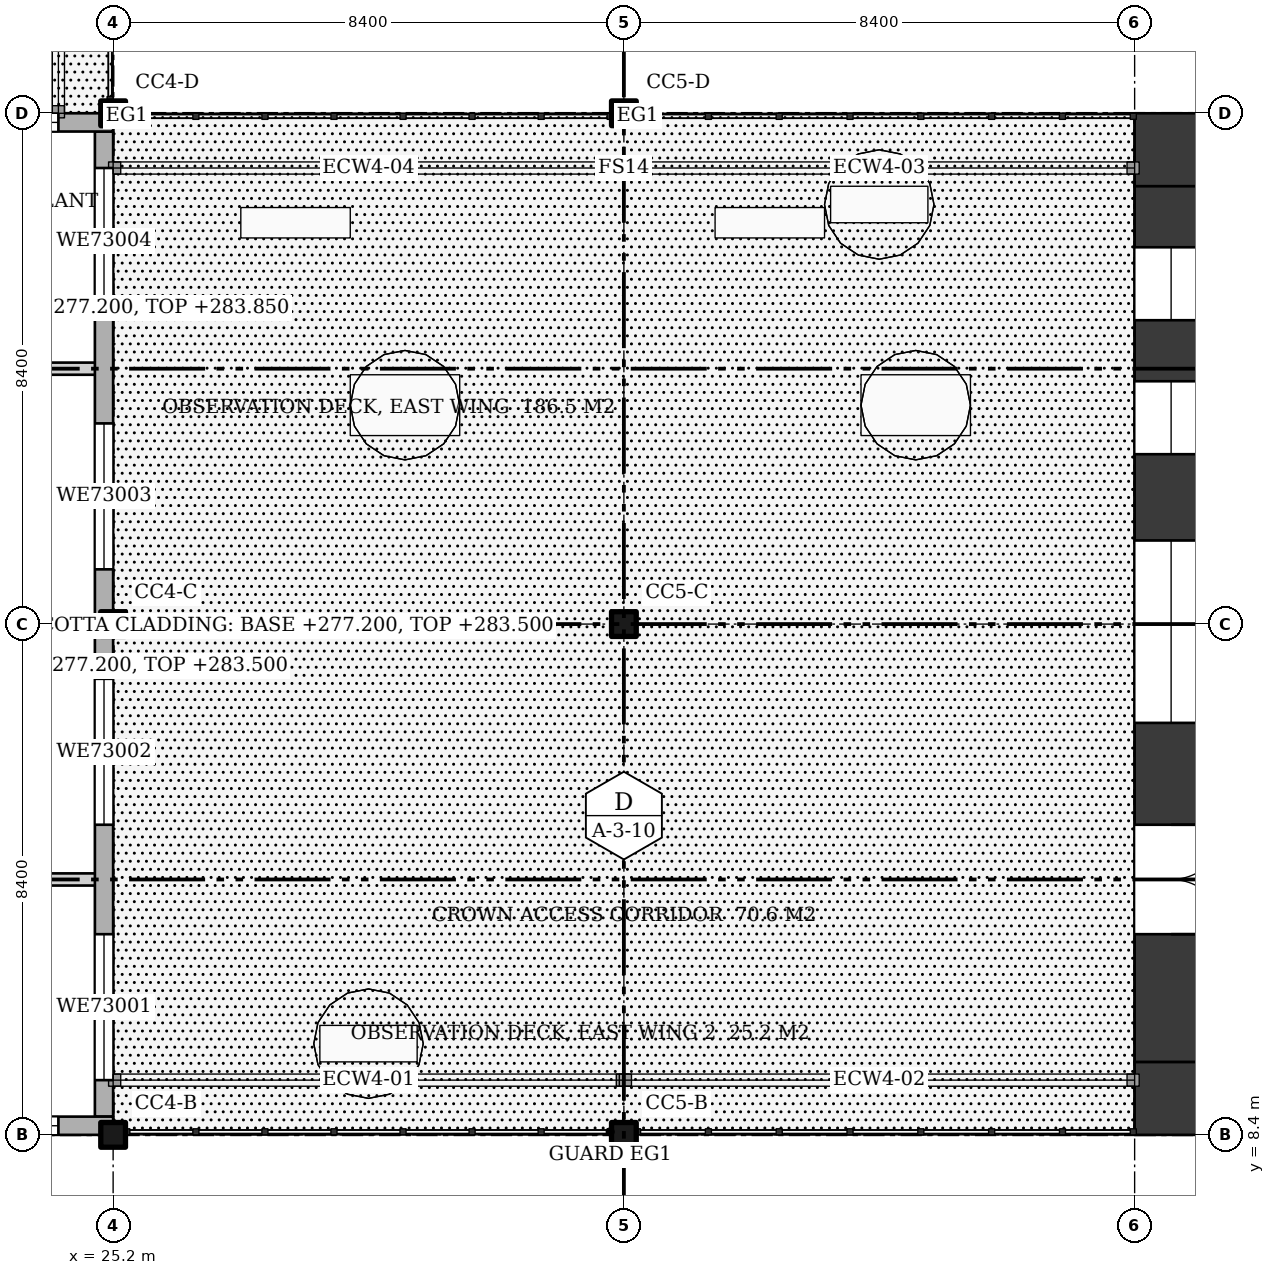
"""IFC4 building model, lengths in metres.
Left out: names, types, materials, properties, quantities, classifications, styles, units other than length and angle.
Written with IfcOpenShell. Run it as: python <this file> out.ifc"""

import sys

from ifc_helpers import new_model, si_unit, direction, frame, frame_2d, origin, origin_2d, place, context, subcontext, project, spatial, rectangle, hollow_circle, extrude, element, fill, save


model = new_model("IFC4")
c1 = context("Model", 3, precision=1e-05, world=origin(), true_north=direction((0.0, 1.0)))
c2 = subcontext(c1, "Body", "Model", "MODEL_VIEW")
j1 = project(units=[si_unit("LENGTHUNIT", "METRE"), si_unit("PLANEANGLEUNIT", "RADIAN")], contexts=[c1])
p1 = place(None, origin())
s1 = spatial("IfcSite", under=j1, at=p1, CompositionType="ELEMENT")
p2 = place(p1, origin())
s2 = spatial("IfcBuilding", under=s1, at=p2, CompositionType="ELEMENT")
p3 = place(p2, frame((0.0, 0.0, 277.2)))
s3 = spatial("IfcBuildingStorey", under=s2, at=p3, CompositionType="ELEMENT", Elevation=277.2)
for number, where, z_axis, x_axis in (
    (1, (25.2, 8.4, 0.0), (0.0, 0.0, 1.0), (1.0, 0.0, 0.0)),
    (2, (25.2, 16.8, 0.0), (0.0, 0.0, 1.0), (1.0, 0.0, 0.0)),
    (3, (25.2, 25.2, 0.0), (0.0, 0.0, 1.0), (1.0, 0.0, 0.0)),
    (4, (33.6, 8.4, 0.0), (0.0, 0.0, 1.0), (1.0, 0.0, 0.0)),
    (5, (33.6, 16.8, 0.0), (0.0, 0.0, 1.0), (1.0, 0.0, 0.0)),
    (6, (33.6, 25.2, 0.0), (0.0, 0.0, 1.0), (1.0, 0.0, 0.0)),
):
    element("IfcColumn", number, at=place(p3, frame(where, z_axis=z_axis, x_axis=x_axis)), inside=s3, PredefinedType="COLUMN", context=c2, shape_type="SweptSolid", body=[
        extrude(hollow_circle(Radius=0.203, WallThickness=0.016, at=origin_2d()), origin(), (0.0, 0.0, 1.0), 6.65),
    ])
p4 = place(p3, frame((42.0, 9.0, 0.0), z_axis=(0.0, 0.0, 1.0), x_axis=(1.0, 0.0, 0.0)))
e7 = element("IfcWall", 7, at=p4, inside=s3, PredefinedType="SHEAR", context=c2, shape_type="SweptSolid", body=[
    extrude(rectangle(XDim=16.8, YDim=1.2, at=frame_2d((8.4, 0.0))), origin(), (0.0, 0.0, 1.0), 6.58),
])
p5 = place(p4, frame((1.6, 0.0, 0.6)))
e8 = element("IfcOpeningElement", 8, at=p5, cuts=e7, PredefinedType="OPENING", context=c2, shape_type="SweptSolid", body=[
    extrude(rectangle(XDim=2.4, YDim=2.1, at=frame_2d((1.2, 1.05))), frame((0.0, 0.61, 0.0), z_axis=(0.0, -1.0, 0.0), x_axis=(1.0, 0.0, 0.0)), (0.0, 0.0, 1.0), 1.22),
])
p6 = place(p4, frame((4.938, 0.0, 1.6)))
e9 = element("IfcOpeningElement", 9, at=p6, cuts=e7, PredefinedType="OPENING", context=c2, shape_type="SweptSolid", body=[
    extrude(rectangle(XDim=3.0, YDim=1.2, at=frame_2d((1.5, 0.6))), frame((0.0, 0.61, 0.0), z_axis=(0.0, -1.0, 0.0), x_axis=(1.0, 0.0, 0.0)), (0.0, 0.0, 1.0), 1.22),
])
p7 = place(p4, frame((8.863, 0.0, 1.6)))
e10 = element("IfcOpeningElement", 10, at=p7, cuts=e7, PredefinedType="OPENING", context=c2, shape_type="SweptSolid", body=[
    extrude(rectangle(XDim=3.0, YDim=1.2, at=frame_2d((1.5, 0.6))), frame((0.0, 0.61, 0.0), z_axis=(0.0, -1.0, 0.0), x_axis=(1.0, 0.0, 0.0)), (0.0, 0.0, 1.0), 1.22),
])
p8 = place(p4, frame((12.8, 0.0, 0.6)))
e11 = element("IfcOpeningElement", 11, at=p8, cuts=e7, PredefinedType="OPENING", context=c2, shape_type="SweptSolid", body=[
    extrude(rectangle(XDim=2.4, YDim=2.1, at=frame_2d((1.2, 1.05))), frame((0.0, 0.61, 0.0), z_axis=(0.0, -1.0, 0.0), x_axis=(1.0, 0.0, 0.0)), (0.0, 0.0, 1.0), 1.22),
])
p9 = place(p3, frame((42.0, 24.6, 0.0), z_axis=(0.0, 0.0, 1.0), x_axis=(1.0, 0.0, 0.0)))
e12 = element("IfcWall", 12, at=p9, inside=s3, PredefinedType="SHEAR", context=c2, shape_type="SweptSolid", body=[
    extrude(rectangle(XDim=16.8, YDim=1.2, at=frame_2d((8.4, 0.0))), origin(), (0.0, 0.0, 1.0), 6.58),
])
p10 = place(p9, frame((1.8, 0.0, 0.5)))
e13 = element("IfcOpeningElement", 13, at=p10, cuts=e12, PredefinedType="OPENING", context=c2, shape_type="SweptSolid", body=[
    extrude(rectangle(XDim=1.8, YDim=2.4, at=frame_2d((0.9, 1.2))), frame((0.0, 0.61, 0.0), z_axis=(0.0, -1.0, 0.0), x_axis=(1.0, 0.0, 0.0)), (0.0, 0.0, 1.0), 1.22),
])
p11 = place(p9, frame((4.644, 0.0, 1.6)))
e14 = element("IfcOpeningElement", 14, at=p11, cuts=e12, PredefinedType="OPENING", context=c2, shape_type="SweptSolid", body=[
    extrude(rectangle(XDim=1.2, YDim=1.2, at=frame_2d((0.6, 0.6))), frame((0.0, 0.61, 0.0), z_axis=(0.0, -1.0, 0.0), x_axis=(1.0, 0.0, 0.0)), (0.0, 0.0, 1.0), 1.22),
])
p12 = place(p9, frame((6.45, 0.0, 1.6)))
e15 = element("IfcOpeningElement", 15, at=p12, cuts=e12, PredefinedType="OPENING", context=c2, shape_type="SweptSolid", body=[
    extrude(rectangle(XDim=1.8, YDim=1.2, at=frame_2d((0.9, 0.6))), frame((0.0, 0.61, 0.0), z_axis=(0.0, -1.0, 0.0), x_axis=(1.0, 0.0, 0.0)), (0.0, 0.0, 1.0), 1.22),
])
p13 = place(p9, frame((12.65, 0.0, 0.6)))
e16 = element("IfcOpeningElement", 16, at=p13, cuts=e12, PredefinedType="OPENING", context=c2, shape_type="SweptSolid", body=[
    extrude(rectangle(XDim=1.0, YDim=2.1, at=frame_2d((0.5, 1.05))), frame((0.0, 0.61, 0.0), z_axis=(0.0, -1.0, 0.0), x_axis=(1.0, 0.0, 0.0)), (0.0, 0.0, 1.0), 1.22),
])
p14 = place(p9, frame((14.175, 0.0, 1.6)))
e17 = element("IfcOpeningElement", 17, at=p14, cuts=e12, PredefinedType="OPENING", context=c2, shape_type="SweptSolid", body=[
    extrude(rectangle(XDim=1.2, YDim=1.2, at=frame_2d((0.6, 0.6))), frame((0.0, 0.61, 0.0), z_axis=(0.0, -1.0, 0.0), x_axis=(1.0, 0.0, 0.0)), (0.0, 0.0, 1.0), 1.22),
])
p15 = place(p3, frame((42.6, 9.6, 0.0), z_axis=(0.0, 0.0, 1.0), x_axis=(0.0, 1.0, 0.0)))
e18 = element("IfcWall", 18, at=p15, inside=s3, PredefinedType="SHEAR", context=c2, shape_type="SweptSolid", body=[
    extrude(rectangle(XDim=14.4, YDim=1.2, at=frame_2d((7.2, 0.0))), origin(), (0.0, 0.0, 1.0), 6.58),
])
p16 = place(p15, frame((2.1, 0.0, 0.0)))
e19 = element("IfcOpeningElement", 19, at=p16, cuts=e18, PredefinedType="OPENING", context=c2, shape_type="SweptSolid", body=[
    extrude(rectangle(XDim=1.8, YDim=2.1, at=frame_2d((0.9, 1.05))), frame((0.0, 0.61, 0.0), z_axis=(0.0, -1.0, 0.0), x_axis=(1.0, 0.0, 0.0)), (0.0, 0.0, 1.0), 1.22),
])
p17 = place(p15, frame((5.575, 0.0, 0.6)))
e20 = element("IfcOpeningElement", 20, at=p17, cuts=e18, PredefinedType="OPENING", context=c2, shape_type="SweptSolid", body=[
    extrude(rectangle(XDim=3.0, YDim=2.1, at=frame_2d((1.5, 1.05))), frame((0.0, 0.61, 0.0), z_axis=(0.0, -1.0, 0.0), x_axis=(1.0, 0.0, 0.0)), (0.0, 0.0, 1.0), 1.22),
])
p18 = place(p15, frame((9.993, 0.0, 0.5)))
e21 = element("IfcOpeningElement", 21, at=p18, cuts=e18, PredefinedType="OPENING", context=c2, shape_type="SweptSolid", body=[
    extrude(rectangle(XDim=1.2, YDim=2.4, at=frame_2d((0.6, 1.2))), frame((0.0, 0.61, 0.0), z_axis=(0.0, -1.0, 0.0), x_axis=(1.0, 0.0, 0.0)), (0.0, 0.0, 1.0), 1.22),
])
p19 = place(p15, frame((12.197, 0.0, 0.5)))
e22 = element("IfcOpeningElement", 22, at=p19, cuts=e18, PredefinedType="OPENING", context=c2, shape_type="SweptSolid", body=[
    extrude(rectangle(XDim=1.2, YDim=2.4, at=frame_2d((0.6, 1.2))), frame((0.0, 0.61, 0.0), z_axis=(0.0, -1.0, 0.0), x_axis=(1.0, 0.0, 0.0)), (0.0, 0.0, 1.0), 1.22),
])
p20 = place(p3, frame((19.1, 12.6, 0.0), z_axis=(0.0, 0.0, 1.0), x_axis=(1.0, 0.0, 0.0)))
e23 = element("IfcWall", 23, at=p20, inside=s3, PredefinedType="PARTITIONING", context=c2, shape_type="SweptSolid", body=[
    extrude(rectangle(XDim=5.95, YDim=0.2, at=frame_2d((2.975, 0.0))), origin(), (0.0, 0.0, 1.0), 6.65),
])
p21 = place(p20, frame((2.475, 0.0, 0.0)))
e24 = element("IfcOpeningElement", 24, at=p21, cuts=e23, PredefinedType="OPENING", context=c2, shape_type="SweptSolid", body=[
    extrude(rectangle(XDim=1.0, YDim=2.1, at=frame_2d((0.5, 1.05))), frame((0.0, 0.11, 0.0), z_axis=(0.0, -1.0, 0.0), x_axis=(1.0, 0.0, 0.0)), (0.0, 0.0, 1.0), 0.22),
])
p22 = place(p3, frame((19.1, 16.8, 0.0), z_axis=(0.0, 0.0, 1.0), x_axis=(1.0, 0.0, 0.0)))
e25 = element("IfcWall", 25, at=p22, inside=s3, PredefinedType="PARTITIONING", context=c2, shape_type="SweptSolid", body=[
    extrude(rectangle(XDim=5.9, YDim=0.2, at=frame_2d((2.95, 0.0))), origin(), (0.0, 0.0, 1.0), 6.3),
])
p23 = place(p3, frame((19.1, 21.0, 0.0), z_axis=(0.0, 0.0, 1.0), x_axis=(1.0, 0.0, 0.0)))
e26 = element("IfcWall", 26, at=p23, inside=s3, PredefinedType="PARTITIONING", context=c2, shape_type="SweptSolid", body=[
    extrude(rectangle(XDim=5.95, YDim=0.2, at=frame_2d((2.975, 0.0))), origin(), (0.0, 0.0, 1.0), 6.65),
])
p24 = place(p3, frame((25.05, 8.7, 0.0), z_axis=(0.0, 0.0, 1.0), x_axis=(0.0, 1.0, 0.0)))
e27 = element("IfcWall", 27, at=p24, inside=s3, PredefinedType="SOLIDWALL", context=c2, shape_type="SweptSolid", body=[
    extrude(rectangle(XDim=16.2, YDim=0.3, at=frame_2d((8.1, 0.0))), origin(), (0.0, 0.0, 1.0), 6.3),
])
p25 = place(p24, frame((0.6, 0.0, 0.6)))
e28 = element("IfcOpeningElement", 28, at=p25, cuts=e27, PredefinedType="OPENING", context=c2, shape_type="SweptSolid", body=[
    extrude(rectangle(XDim=2.4, YDim=2.4, at=frame_2d((1.2, 1.2))), frame((0.0, 0.16, 0.0), z_axis=(0.0, -1.0, 0.0), x_axis=(1.0, 0.0, 0.0)), (0.0, 0.0, 1.0), 0.32),
])
p26 = place(p24, frame((4.8, 0.0, 0.6)))
e29 = element("IfcOpeningElement", 29, at=p26, cuts=e27, PredefinedType="OPENING", context=c2, shape_type="SweptSolid", body=[
    extrude(rectangle(XDim=2.4, YDim=2.4, at=frame_2d((1.2, 1.2))), frame((0.0, 0.16, 0.0), z_axis=(0.0, -1.0, 0.0), x_axis=(1.0, 0.0, 0.0)), (0.0, 0.0, 1.0), 0.32),
])
p27 = place(p24, frame((9.0, 0.0, 0.6)))
e30 = element("IfcOpeningElement", 30, at=p27, cuts=e27, PredefinedType="OPENING", context=c2, shape_type="SweptSolid", body=[
    extrude(rectangle(XDim=2.4, YDim=2.4, at=frame_2d((1.2, 1.2))), frame((0.0, 0.16, 0.0), z_axis=(0.0, -1.0, 0.0), x_axis=(1.0, 0.0, 0.0)), (0.0, 0.0, 1.0), 0.32),
])
p28 = place(p24, frame((13.2, 0.0, 0.6)))
e31 = element("IfcOpeningElement", 31, at=p28, cuts=e27, PredefinedType="OPENING", context=c2, shape_type="SweptSolid", body=[
    extrude(rectangle(XDim=2.4, YDim=2.4, at=frame_2d((1.2, 1.2))), frame((0.0, 0.16, 0.0), z_axis=(0.0, -1.0, 0.0), x_axis=(1.0, 0.0, 0.0)), (0.0, 0.0, 1.0), 0.32),
])
p29 = place(p3, frame((25.2, 25.05, 0.0), z_axis=(0.0, 0.0, 1.0), x_axis=(-1.0, 0.0, 0.0)))
e32 = element("IfcWall", 32, at=p29, inside=s3, PredefinedType="SOLIDWALL", context=c2, shape_type="SweptSolid", body=[
    extrude(rectangle(XDim=16.8, YDim=0.3, at=frame_2d((8.4, 0.0))), origin(), (0.0, 0.0, 1.0), 6.3),
])
p30 = place(p29, frame((13.5, 0.0, 0.6)))
e33 = element("IfcOpeningElement", 33, at=p30, cuts=e32, PredefinedType="OPENING", context=c2, shape_type="SweptSolid", body=[
    extrude(rectangle(XDim=2.4, YDim=2.4, at=frame_2d((1.2, 1.2))), frame((0.0, 0.16, 0.0), z_axis=(0.0, -1.0, 0.0), x_axis=(1.0, 0.0, 0.0)), (0.0, 0.0, 1.0), 0.32),
])
p31 = place(p29, frame((9.0, 0.0, 0.6)))
e34 = element("IfcOpeningElement", 34, at=p31, cuts=e32, PredefinedType="OPENING", context=c2, shape_type="SweptSolid", body=[
    extrude(rectangle(XDim=2.4, YDim=2.4, at=frame_2d((1.2, 1.2))), frame((0.0, 0.16, 0.0), z_axis=(0.0, -1.0, 0.0), x_axis=(1.0, 0.0, 0.0)), (0.0, 0.0, 1.0), 0.32),
])
p32 = place(p29, frame((0.9, 0.0, 0.6)))
e35 = element("IfcOpeningElement", 35, at=p32, cuts=e32, PredefinedType="OPENING", context=c2, shape_type="SweptSolid", body=[
    extrude(rectangle(XDim=2.4, YDim=2.4, at=frame_2d((1.2, 1.2))), frame((0.0, 0.16, 0.0), z_axis=(0.0, -1.0, 0.0), x_axis=(1.0, 0.0, 0.0)), (0.0, 0.0, 1.0), 0.32),
])
p33 = place(p3, frame((8.4, 8.55, 0.0), z_axis=(0.0, 0.0, 1.0), x_axis=(1.0, 0.0, 0.0)))
e36 = element("IfcWall", 36, at=p33, inside=s3, PredefinedType="SOLIDWALL", context=c2, shape_type="SweptSolid", body=[
    extrude(rectangle(XDim=16.8, YDim=0.3, at=frame_2d((8.4, 0.0))), origin(), (0.0, 0.0, 1.0), 6.062),
])
p34 = place(p33, frame((0.9, 0.0, 0.6)))
e37 = element("IfcOpeningElement", 37, at=p34, cuts=e36, PredefinedType="OPENING", context=c2, shape_type="SweptSolid", body=[
    extrude(rectangle(XDim=2.4, YDim=2.4, at=frame_2d((1.2, 1.2))), frame((0.0, 0.16, 0.0), z_axis=(0.0, -1.0, 0.0), x_axis=(1.0, 0.0, 0.0)), (0.0, 0.0, 1.0), 0.32),
])
p35 = place(p33, frame((5.1, 0.0, 0.6)))
e38 = element("IfcOpeningElement", 38, at=p35, cuts=e36, PredefinedType="OPENING", context=c2, shape_type="SweptSolid", body=[
    extrude(rectangle(XDim=2.4, YDim=2.4, at=frame_2d((1.2, 1.2))), frame((0.0, 0.16, 0.0), z_axis=(0.0, -1.0, 0.0), x_axis=(1.0, 0.0, 0.0)), (0.0, 0.0, 1.0), 0.32),
])
p36 = place(p33, frame((9.3, 0.0, 0.6)))
e39 = element("IfcOpeningElement", 39, at=p36, cuts=e36, PredefinedType="OPENING", context=c2, shape_type="SweptSolid", body=[
    extrude(rectangle(XDim=2.4, YDim=2.4, at=frame_2d((1.2, 1.2))), frame((0.0, 0.16, 0.0), z_axis=(0.0, -1.0, 0.0), x_axis=(1.0, 0.0, 0.0)), (0.0, 0.0, 1.0), 0.32),
])
p37 = place(p33, frame((13.5, 0.0, 0.6)))
e40 = element("IfcOpeningElement", 40, at=p37, cuts=e36, PredefinedType="OPENING", context=c2, shape_type="SweptSolid", body=[
    extrude(rectangle(XDim=2.4, YDim=2.4, at=frame_2d((1.2, 1.2))), frame((0.0, 0.16, 0.0), z_axis=(0.0, -1.0, 0.0), x_axis=(1.0, 0.0, 0.0)), (0.0, 0.0, 1.0), 0.32),
])
p38 = place(p16, frame((1.8, 0.0, 0.0), z_axis=(0.0, 0.0, 1.0), x_axis=(-1.0, 0.0, 0.0)))
e41 = element("IfcDoor", 41, at=p38, inside=s3, OperationType="DOUBLE_DOOR_SINGLE_SWING", PredefinedType="DOOR", context=c2, shape_type="SweptSolid", body=[
    extrude(rectangle(XDim=1.8, YDim=2.1, at=frame_2d((0.9, 1.05))), frame((0.0, 0.025, 0.0), z_axis=(0.0, -1.0, 0.0), x_axis=(1.0, 0.0, 0.0)), (0.0, 0.0, 1.0), 0.05),
])
fill(e19, e41)
p39 = place(p17, origin())
e42 = element("IfcWindow", 42, at=p39, inside=s3, PartitioningType="SINGLE_PANEL", PredefinedType="WINDOW", context=c2, shape_type="SweptSolid", body=[
    extrude(rectangle(XDim=3.0, YDim=2.1, at=frame_2d((1.5, 1.05))), frame((0.0, 0.03, 0.0), z_axis=(0.0, -1.0, 0.0), x_axis=(1.0, 0.0, 0.0)), (0.0, 0.0, 1.0), 0.06),
])
fill(e20, e42)
p40 = place(p18, origin())
e43 = element("IfcWindow", 43, at=p40, inside=s3, PartitioningType="SINGLE_PANEL", PredefinedType="WINDOW", context=c2, shape_type="SweptSolid", body=[
    extrude(rectangle(XDim=1.2, YDim=2.4, at=frame_2d((0.6, 1.2))), frame((0.0, 0.03, 0.0), z_axis=(0.0, -1.0, 0.0), x_axis=(1.0, 0.0, 0.0)), (0.0, 0.0, 1.0), 0.06),
])
fill(e21, e43)
p41 = place(p19, origin())
e44 = element("IfcWindow", 44, at=p41, inside=s3, PartitioningType="SINGLE_PANEL", PredefinedType="WINDOW", context=c2, shape_type="SweptSolid", body=[
    extrude(rectangle(XDim=1.2, YDim=2.4, at=frame_2d((0.6, 1.2))), frame((0.0, 0.03, 0.0), z_axis=(0.0, -1.0, 0.0), x_axis=(1.0, 0.0, 0.0)), (0.0, 0.0, 1.0), 0.06),
])
fill(e22, e44)
p42 = place(p25, origin())
e45 = element("IfcWindow", 45, at=p42, inside=s3, PartitioningType="SINGLE_PANEL", PredefinedType="WINDOW", context=c2, shape_type="SweptSolid", body=[
    extrude(rectangle(XDim=2.4, YDim=2.4, at=frame_2d((1.2, 1.2))), frame((0.0, 0.03, 0.0), z_axis=(0.0, -1.0, 0.0), x_axis=(1.0, 0.0, 0.0)), (0.0, 0.0, 1.0), 0.06),
])
fill(e28, e45)
p43 = place(p26, origin())
e46 = element("IfcWindow", 46, at=p43, inside=s3, PartitioningType="SINGLE_PANEL", PredefinedType="WINDOW", context=c2, shape_type="SweptSolid", body=[
    extrude(rectangle(XDim=2.4, YDim=2.4, at=frame_2d((1.2, 1.2))), frame((0.0, 0.03, 0.0), z_axis=(0.0, -1.0, 0.0), x_axis=(1.0, 0.0, 0.0)), (0.0, 0.0, 1.0), 0.06),
])
fill(e29, e46)
p44 = place(p27, origin())
e47 = element("IfcWindow", 47, at=p44, inside=s3, PartitioningType="SINGLE_PANEL", PredefinedType="WINDOW", context=c2, shape_type="SweptSolid", body=[
    extrude(rectangle(XDim=2.4, YDim=2.4, at=frame_2d((1.2, 1.2))), frame((0.0, 0.03, 0.0), z_axis=(0.0, -1.0, 0.0), x_axis=(1.0, 0.0, 0.0)), (0.0, 0.0, 1.0), 0.06),
])
fill(e30, e47)
p45 = place(p28, origin())
e48 = element("IfcWindow", 48, at=p45, inside=s3, PartitioningType="SINGLE_PANEL", PredefinedType="WINDOW", context=c2, shape_type="SweptSolid", body=[
    extrude(rectangle(XDim=2.4, YDim=2.4, at=frame_2d((1.2, 1.2))), frame((0.0, 0.03, 0.0), z_axis=(0.0, -1.0, 0.0), x_axis=(1.0, 0.0, 0.0)), (0.0, 0.0, 1.0), 0.06),
])
fill(e31, e48)
p46 = place(p32, origin())
e49 = element("IfcWindow", 49, at=p46, inside=s3, PartitioningType="SINGLE_PANEL", PredefinedType="WINDOW", context=c2, shape_type="SweptSolid", body=[
    extrude(rectangle(XDim=2.4, YDim=2.4, at=frame_2d((1.2, 1.2))), frame((0.0, 0.03, 0.0), z_axis=(0.0, -1.0, 0.0), x_axis=(1.0, 0.0, 0.0)), (0.0, 0.0, 1.0), 0.06),
])
fill(e35, e49)
p47 = place(p37, origin())
e50 = element("IfcWindow", 50, at=p47, inside=s3, PartitioningType="SINGLE_PANEL", PredefinedType="WINDOW", context=c2, shape_type="SweptSolid", body=[
    extrude(rectangle(XDim=2.4, YDim=2.4, at=frame_2d((1.2, 1.2))), frame((0.0, 0.03, 0.0), z_axis=(0.0, -1.0, 0.0), x_axis=(1.0, 0.0, 0.0)), (0.0, 0.0, 1.0), 0.06),
])
fill(e40, e50)
save(model, sys.argv[1])
